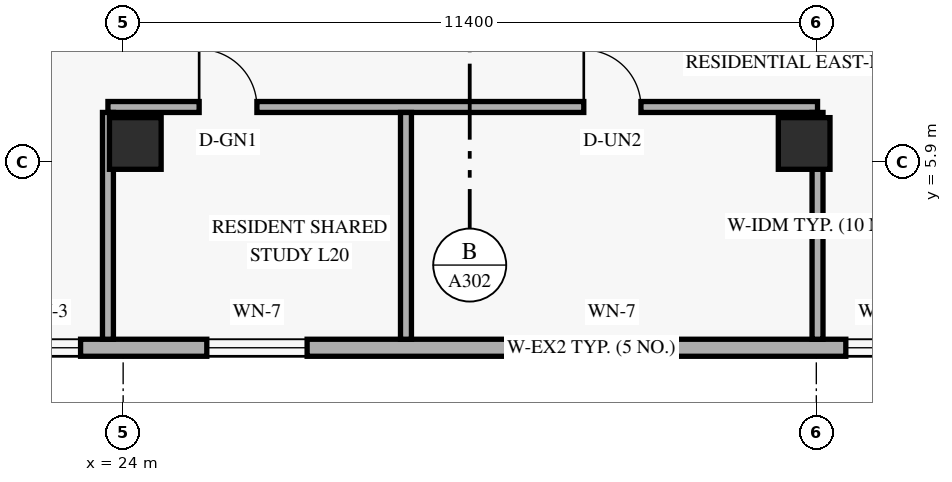
"""IFC4 building model, lengths in metres.
Left out: names, types, materials, properties, quantities, classifications, styles, units other than length and angle.
Written with IfcOpenShell. Run it as: python <this file> out.ifc"""

import sys

from ifc_helpers import new_model, si_unit, direction, frame, frame_2d, origin, origin_2d, place, context, subcontext, project, spatial, rectangle, extrude, element, fill, save


model = new_model("IFC4")
c1 = context("Model", 3, precision=1e-05, world=origin(), true_north=direction((0.0, 1.0)))
c2 = subcontext(c1, "Body", "Model", "MODEL_VIEW")
j1 = project(units=[si_unit("LENGTHUNIT", "METRE"), si_unit("PLANEANGLEUNIT", "RADIAN")], contexts=[c1])
p1 = place(None, origin())
s1 = spatial("IfcSite", under=j1, at=p1, CompositionType="ELEMENT")
p2 = place(p1, origin())
s2 = spatial("IfcBuilding", under=s1, at=p2, CompositionType="ELEMENT")
p3 = place(p2, frame((0.0, 0.0, 80.4)))
s3 = spatial("IfcBuildingStorey", under=s2, at=p3, CompositionType="ELEMENT", Elevation=80.4)
for number, where, z_axis, x_axis in (
    (1, (24.2, 6.2, 0.0), (0.0, 0.0, 1.0), (1.0, 0.0, 0.0)),
    (2, (35.2, 6.2, 0.0), (0.0, 0.0, 1.0), (1.0, 0.0, 0.0)),
):
    element("IfcColumn", number, at=place(p3, frame(where, z_axis=z_axis, x_axis=x_axis)), inside=s3, PredefinedType="COLUMN", context=c2, shape_type="SweptSolid", body=[
        extrude(rectangle(XDim=0.85, YDim=0.85, at=origin_2d()), origin(), (0.0, 0.0, 1.0), 3.6),
    ])
p4 = place(p3, frame((13.42, 2.84, 0.0), z_axis=(0.0, 0.0, 1.0), x_axis=(1.0, 0.0, 0.0)))
e3 = element("IfcWall", 3, at=p4, inside=s3, PredefinedType="SOLIDWALL", context=c2, shape_type="SweptSolid", body=[
    extrude(rectangle(XDim=36.56, YDim=0.28, at=frame_2d((18.28, 0.0))), origin(), (0.0, 0.0, 1.0), 3.36),
])
p5 = place(p4, frame((3.29, 0.0, 0.85)))
e4 = element("IfcOpeningElement", 4, at=p5, cuts=e3, PredefinedType="OPENING", context=c2, shape_type="SweptSolid", body=[
    extrude(rectangle(XDim=1.65, YDim=1.6, at=frame_2d((0.825, 0.8))), frame((0.0, 0.15, 0.0), z_axis=(0.0, -1.0, 0.0), x_axis=(1.0, 0.0, 0.0)), (0.0, 0.0, 1.0), 0.3),
])
p6 = place(p4, frame((8.68, 0.0, 0.85)))
e5 = element("IfcOpeningElement", 5, at=p6, cuts=e3, PredefinedType="OPENING", context=c2, shape_type="SweptSolid", body=[
    extrude(rectangle(XDim=1.2, YDim=1.5, at=frame_2d((0.6, 0.75))), frame((0.0, 0.15, 0.0), z_axis=(0.0, -1.0, 0.0), x_axis=(1.0, 0.0, 0.0)), (0.0, 0.0, 1.0), 0.3),
])
p7 = place(p4, frame((11.956, 0.0, 0.85)))
e6 = element("IfcOpeningElement", 6, at=p7, cuts=e3, PredefinedType="OPENING", context=c2, shape_type="SweptSolid", body=[
    extrude(rectangle(XDim=1.65, YDim=1.6, at=frame_2d((0.825, 0.8))), frame((0.0, 0.15, 0.0), z_axis=(0.0, -1.0, 0.0), x_axis=(1.0, 0.0, 0.0)), (0.0, 0.0, 1.0), 0.3),
])
p8 = place(p4, frame((17.791, 0.0, 0.85)))
e7 = element("IfcOpeningElement", 7, at=p8, cuts=e3, PredefinedType="OPENING", context=c2, shape_type="SweptSolid", body=[
    extrude(rectangle(XDim=1.65, YDim=1.6, at=frame_2d((0.825, 0.8))), frame((0.0, 0.15, 0.0), z_axis=(0.0, -1.0, 0.0), x_axis=(1.0, 0.0, 0.0)), (0.0, 0.0, 1.0), 0.3),
])
p9 = place(p4, frame((22.465, 0.0, 0.85)))
e8 = element("IfcOpeningElement", 8, at=p9, cuts=e3, PredefinedType="OPENING", context=c2, shape_type="SweptSolid", body=[
    extrude(rectangle(XDim=1.2, YDim=1.5, at=frame_2d((0.6, 0.75))), frame((0.0, 0.15, 0.0), z_axis=(0.0, -1.0, 0.0), x_axis=(1.0, 0.0, 0.0)), (0.0, 0.0, 1.0), 0.3),
])
p10 = place(p4, frame((29.52, 0.0, 0.85)))
e9 = element("IfcOpeningElement", 9, at=p10, cuts=e3, PredefinedType="OPENING", context=c2, shape_type="SweptSolid", body=[
    extrude(rectangle(XDim=1.65, YDim=1.6, at=frame_2d((0.825, 0.8))), frame((0.0, 0.15, 0.0), z_axis=(0.0, -1.0, 0.0), x_axis=(1.0, 0.0, 0.0)), (0.0, 0.0, 1.0), 0.3),
])
p11 = place(p3, frame((23.75, 6.8, 0.0), z_axis=(0.0, 0.0, 1.0), x_axis=(1.0, 0.0, 0.0)))
e10 = element("IfcWall", 10, at=p11, inside=s3, PredefinedType="STANDARD", context=c2, shape_type="SweptSolid", body=[
    extrude(rectangle(XDim=11.67, YDim=0.18, at=frame_2d((5.835, 0.0))), origin(), (0.0, 0.0, 1.0), 2.731),
])
p12 = place(p11, frame((1.5, 0.0, 0.0)))
e11 = element("IfcOpeningElement", 11, at=p12, cuts=e10, PredefinedType="OPENING", context=c2, shape_type="SweptSolid", body=[
    extrude(rectangle(XDim=0.95, YDim=2.15, at=frame_2d((0.475, 1.075))), frame((0.0, 0.1, 0.0), z_axis=(0.0, -1.0, 0.0), x_axis=(1.0, 0.0, 0.0)), (0.0, 0.0, 1.0), 0.2),
])
p13 = place(p11, frame((7.826, 0.0, 0.0)))
e12 = element("IfcOpeningElement", 12, at=p13, cuts=e10, PredefinedType="OPENING", context=c2, shape_type="SweptSolid", body=[
    extrude(rectangle(XDim=0.94, YDim=2.15, at=frame_2d((0.47, 1.075))), frame((0.0, 0.1, 0.0), z_axis=(0.0, -1.0, 0.0), x_axis=(1.0, 0.0, 0.0)), (0.0, 0.0, 1.0), 0.2),
])
p14 = place(p3, frame((35.42, 2.98, 0.0), z_axis=(0.0, 0.0, 1.0), x_axis=(0.0, 1.0, 0.0)))
e13 = element("IfcWall", 13, at=p14, inside=s3, PredefinedType="PARTITIONING", context=c2, shape_type="SweptSolid", body=[
    extrude(rectangle(XDim=3.73, YDim=0.18, at=frame_2d((1.865, 0.0))), origin(), (0.0, 0.0, 1.0), 2.731),
])
for number, where, z_axis, x_axis in (
    (14, (23.75, 2.98, 0.0), (0.0, 0.0, 1.0), (0.0, 1.0, 0.0)),
    (15, (28.651, 2.98, 0.0), (0.0, 0.0, 1.0), (0.0, 1.0, 0.0)),
):
    element("IfcWall", number, at=place(p3, frame(where, z_axis=z_axis, x_axis=x_axis)), inside=s3, PredefinedType="PARTITIONING", context=c2, shape_type="SweptSolid", body=[
        extrude(rectangle(XDim=3.73, YDim=0.18, at=frame_2d((1.865, 0.0))), origin(), (0.0, 0.0, 1.0), 2.809),
    ])
p15 = place(p6, origin())
e16 = element("IfcWindow", 16, at=p15, inside=s3, PartitioningType="SINGLE_PANEL", PredefinedType="WINDOW", context=c2, shape_type="SweptSolid", body=[
    extrude(rectangle(XDim=1.2, YDim=1.5, at=frame_2d((0.6, 0.75))), frame((0.0, 0.03, 0.0), z_axis=(0.0, -1.0, 0.0), x_axis=(1.0, 0.0, 0.0)), (0.0, 0.0, 1.0), 0.06),
])
fill(e5, e16)
p16 = place(p7, origin())
e17 = element("IfcWindow", 17, at=p16, inside=s3, PartitioningType="SINGLE_PANEL", PredefinedType="WINDOW", context=c2, shape_type="SweptSolid", body=[
    extrude(rectangle(XDim=1.65, YDim=1.6, at=frame_2d((0.825, 0.8))), frame((0.0, 0.03, 0.0), z_axis=(0.0, -1.0, 0.0), x_axis=(1.0, 0.0, 0.0)), (0.0, 0.0, 1.0), 0.06),
])
fill(e6, e17)
p17 = place(p8, origin())
e18 = element("IfcWindow", 18, at=p17, inside=s3, PartitioningType="SINGLE_PANEL", PredefinedType="WINDOW", context=c2, shape_type="SweptSolid", body=[
    extrude(rectangle(XDim=1.65, YDim=1.6, at=frame_2d((0.825, 0.8))), frame((0.0, 0.03, 0.0), z_axis=(0.0, -1.0, 0.0), x_axis=(1.0, 0.0, 0.0)), (0.0, 0.0, 1.0), 0.06),
])
fill(e7, e18)
p18 = place(p9, origin())
e19 = element("IfcWindow", 19, at=p18, inside=s3, PartitioningType="SINGLE_PANEL", PredefinedType="WINDOW", context=c2, shape_type="SweptSolid", body=[
    extrude(rectangle(XDim=1.2, YDim=1.5, at=frame_2d((0.6, 0.75))), frame((0.0, 0.03, 0.0), z_axis=(0.0, -1.0, 0.0), x_axis=(1.0, 0.0, 0.0)), (0.0, 0.0, 1.0), 0.06),
])
fill(e8, e19)
p19 = place(p12, origin())
e20 = element("IfcDoor", 20, at=p19, inside=s3, OperationType="SINGLE_SWING_LEFT", PredefinedType="DOOR", context=c2, shape_type="SweptSolid", body=[
    extrude(rectangle(XDim=0.95, YDim=2.15, at=frame_2d((0.475, 1.075))), frame((0.0, 0.025, 0.0), z_axis=(0.0, -1.0, 0.0), x_axis=(1.0, 0.0, 0.0)), (0.0, 0.0, 1.0), 0.05),
])
fill(e11, e20)
p20 = place(p13, origin())
e21 = element("IfcDoor", 21, at=p20, inside=s3, OperationType="SINGLE_SWING_LEFT", PredefinedType="DOOR", context=c2, shape_type="SweptSolid", body=[
    extrude(rectangle(XDim=0.94, YDim=2.15, at=frame_2d((0.47, 1.075))), frame((0.0, 0.025, 0.0), z_axis=(0.0, -1.0, 0.0), x_axis=(1.0, 0.0, 0.0)), (0.0, 0.0, 1.0), 0.05),
])
fill(e12, e21)
save(model, sys.argv[1])
